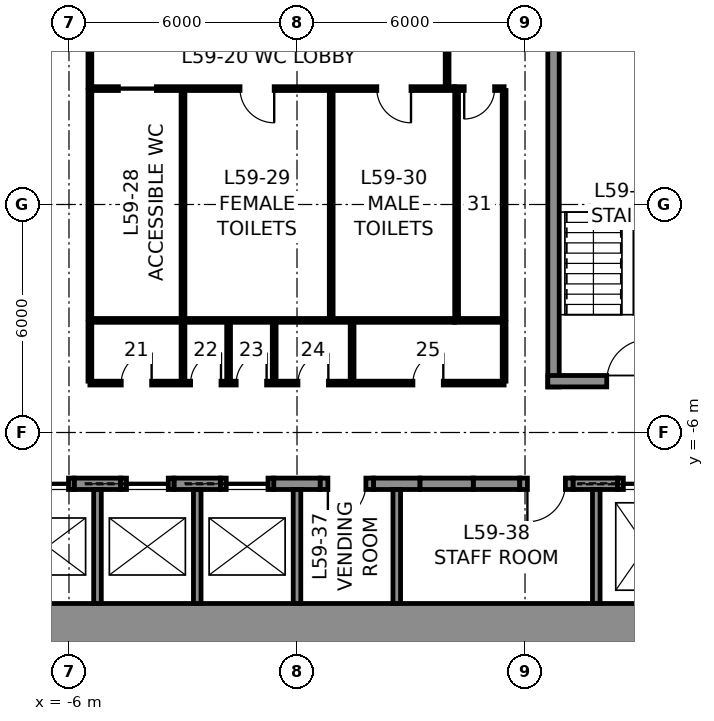
"""IFC4 building model, lengths in metres.
Left out: names, types, materials, properties, quantities, classifications, styles, units other than length and angle.
Written with IfcOpenShell. Run it as: python <this file> out.ifc"""

import sys

from ifc_helpers import new_model, si_unit, direction, frame, frame_2d, origin, place, context, subcontext, project, spatial, rectangle, extrude, element, fill, save


model = new_model("IFC4")
c1 = context("Model", 3, precision=1e-05, world=origin(), true_north=direction((0.0, 1.0)))
c2 = subcontext(c1, "Body", "Model", "MODEL_VIEW")
j1 = project(units=[si_unit("LENGTHUNIT", "METRE"), si_unit("PLANEANGLEUNIT", "RADIAN")], contexts=[c1])
p1 = place(None, origin())
s1 = spatial("IfcSite", under=j1, at=p1, CompositionType="ELEMENT")
p2 = place(p1, origin())
s2 = spatial("IfcBuilding", under=s1, at=p2, CompositionType="ELEMENT")
p3 = place(p2, frame((0.0, 0.0, 265.8)))
s3 = spatial("IfcBuildingStorey", under=s2, at=p3, CompositionType="ELEMENT", Elevation=265.8)
p4 = place(p3, frame((12.0, -11.25, 0.0), z_axis=(0.0, 0.0, 1.0), x_axis=(-1.0, 0.0, 0.0)))
e1 = element("IfcWall", 1, at=p4, inside=s3, PredefinedType="SHEAR", context=c2, shape_type="SweptSolid", body=[
    extrude(rectangle(XDim=24.0, YDim=1.5, at=frame_2d((12.0, 0.0))), origin(), (0.0, 0.0, 1.0), 4.0),
])
for number, where, z_axis, x_axis in (
    (2, (-5.863, -7.35, 0.0), (0.0, 0.0, 1.0), (1.0, 0.0, 0.0)),
    (3, (-3.238, -7.35, 0.0), (0.0, 0.0, 1.0), (1.0, 0.0, 0.0)),
    (4, (-0.613, -7.35, 0.0), (0.0, 0.0, 1.0), (1.0, 0.0, 0.0)),
    (5, (2.012, -7.35, 0.0), (0.0, 0.0, 1.0), (1.0, 0.0, 0.0)),
    (6, (4.637, -7.35, 0.0), (0.0, 0.0, 1.0), (1.0, 0.0, 0.0)),
):
    element("IfcWall", number, at=place(p3, frame(where, z_axis=z_axis, x_axis=x_axis)), inside=s3, PredefinedType="SHEAR", context=c2, shape_type="SweptSolid", body=[
        extrude(rectangle(XDim=1.225, YDim=0.3, at=frame_2d((0.613, 0.0))), origin(), (0.0, 0.0, 1.0), 4.0),
    ])
p5 = place(p3, frame((7.262, -7.35, 0.0), z_axis=(0.0, 0.0, 1.0), x_axis=(1.0, 0.0, 0.0)))
e7 = element("IfcWall", 7, at=p5, inside=s3, PredefinedType="SHEAR", context=c2, shape_type="SweptSolid", body=[
    extrude(rectangle(XDim=1.175, YDim=0.3, at=frame_2d((0.587, 0.0))), origin(), (0.0, 0.0, 1.0), 4.0),
])
p6 = place(p3, frame((-7.262, -7.35, 0.0), z_axis=(0.0, 0.0, 1.0), x_axis=(1.0, 0.0, 0.0)))
e8 = element("IfcWall", 8, at=p6, inside=s3, PredefinedType="PARTITIONING", context=c2, shape_type="SweptSolid", body=[
    extrude(rectangle(XDim=1.4, YDim=0.3, at=frame_2d((0.7, 0.0))), origin(), (0.0, 0.0, 1.0), 4.0),
])
p7 = place(p6, frame((0.15, 0.0, 0.0)))
e9 = element("IfcOpeningElement", 9, at=p7, cuts=e8, PredefinedType="OPENING", context=c2, shape_type="SweptSolid", body=[
    extrude(rectangle(XDim=1.1, YDim=2.3, at=frame_2d((0.55, 1.15))), frame((0.0, 0.16, 0.0), z_axis=(0.0, -1.0, 0.0), x_axis=(1.0, 0.0, 0.0)), (0.0, 0.0, 1.0), 0.32),
])
p8 = place(p3, frame((-4.637, -7.35, 0.0), z_axis=(0.0, 0.0, 1.0), x_axis=(1.0, 0.0, 0.0)))
e10 = element("IfcWall", 10, at=p8, inside=s3, PredefinedType="PARTITIONING", context=c2, shape_type="SweptSolid", body=[
    extrude(rectangle(XDim=1.4, YDim=0.3, at=frame_2d((0.7, 0.0))), origin(), (0.0, 0.0, 1.0), 4.0),
])
p9 = place(p8, frame((0.15, 0.0, 0.0)))
e11 = element("IfcOpeningElement", 11, at=p9, cuts=e10, PredefinedType="OPENING", context=c2, shape_type="SweptSolid", body=[
    extrude(rectangle(XDim=1.1, YDim=2.3, at=frame_2d((0.55, 1.15))), frame((0.0, 0.16, 0.0), z_axis=(0.0, -1.0, 0.0), x_axis=(1.0, 0.0, 0.0)), (0.0, 0.0, 1.0), 0.32),
])
p10 = place(p3, frame((-2.012, -7.35, 0.0), z_axis=(0.0, 0.0, 1.0), x_axis=(1.0, 0.0, 0.0)))
e12 = element("IfcWall", 12, at=p10, inside=s3, PredefinedType="PARTITIONING", context=c2, shape_type="SweptSolid", body=[
    extrude(rectangle(XDim=1.4, YDim=0.3, at=frame_2d((0.7, 0.0))), origin(), (0.0, 0.0, 1.0), 4.0),
])
p11 = place(p10, frame((0.15, 0.0, 0.0)))
e13 = element("IfcOpeningElement", 13, at=p11, cuts=e12, PredefinedType="OPENING", context=c2, shape_type="SweptSolid", body=[
    extrude(rectangle(XDim=1.1, YDim=2.3, at=frame_2d((0.55, 1.15))), frame((0.0, 0.16, 0.0), z_axis=(0.0, -1.0, 0.0), x_axis=(1.0, 0.0, 0.0)), (0.0, 0.0, 1.0), 0.32),
])
p12 = place(p3, frame((0.613, -7.35, 0.0), z_axis=(0.0, 0.0, 1.0), x_axis=(1.0, 0.0, 0.0)))
e14 = element("IfcWall", 14, at=p12, inside=s3, PredefinedType="PARTITIONING", context=c2, shape_type="SweptSolid", body=[
    extrude(rectangle(XDim=1.4, YDim=0.3, at=frame_2d((0.7, 0.0))), origin(), (0.0, 0.0, 1.0), 4.0),
])
p13 = place(p12, frame((0.2, 0.0, 0.0)))
e15 = element("IfcOpeningElement", 15, at=p13, cuts=e14, PredefinedType="OPENING", context=c2, shape_type="SweptSolid", body=[
    extrude(rectangle(XDim=1.0, YDim=2.3, at=frame_2d((0.5, 1.15))), frame((0.0, 0.16, 0.0), z_axis=(0.0, -1.0, 0.0), x_axis=(1.0, 0.0, 0.0)), (0.0, 0.0, 1.0), 0.32),
])
p14 = place(p3, frame((3.238, -7.35, 0.0), z_axis=(0.0, 0.0, 1.0), x_axis=(1.0, 0.0, 0.0)))
e16 = element("IfcWall", 16, at=p14, inside=s3, PredefinedType="PARTITIONING", context=c2, shape_type="SweptSolid", body=[
    extrude(rectangle(XDim=1.4, YDim=0.3, at=frame_2d((0.7, 0.0))), origin(), (0.0, 0.0, 1.0), 4.0),
])
p15 = place(p3, frame((5.863, -7.35, 0.0), z_axis=(0.0, 0.0, 1.0), x_axis=(1.0, 0.0, 0.0)))
e17 = element("IfcWall", 17, at=p15, inside=s3, PredefinedType="PARTITIONING", context=c2, shape_type="SweptSolid", body=[
    extrude(rectangle(XDim=1.4, YDim=0.3, at=frame_2d((0.7, 0.0))), origin(), (0.0, 0.0, 1.0), 4.0),
])
p16 = place(p15, frame((0.2, 0.0, 0.0)))
e18 = element("IfcOpeningElement", 18, at=p16, cuts=e17, PredefinedType="OPENING", context=c2, shape_type="SweptSolid", body=[
    extrude(rectangle(XDim=1.0, YDim=2.3, at=frame_2d((0.5, 1.15))), frame((0.0, 0.16, 0.0), z_axis=(0.0, -1.0, 0.0), x_axis=(1.0, 0.0, 0.0)), (0.0, 0.0, 1.0), 0.32),
])
p17 = place(p3, frame((8.438, -7.35, 0.0), z_axis=(0.0, 0.0, 1.0), x_axis=(1.0, 0.0, 0.0)))
e19 = element("IfcWall", 19, at=p17, inside=s3, PredefinedType="PARTITIONING", context=c2, shape_type="SweptSolid", body=[
    extrude(rectangle(XDim=1.5, YDim=0.3, at=frame_2d((0.75, 0.0))), origin(), (0.0, 0.0, 1.0), 4.0),
])
p18 = place(p17, frame((0.15, 0.0, 0.0)))
e20 = element("IfcOpeningElement", 20, at=p18, cuts=e19, PredefinedType="OPENING", context=c2, shape_type="SweptSolid", body=[
    extrude(rectangle(XDim=1.2, YDim=2.3, at=frame_2d((0.6, 1.15))), frame((0.0, 0.16, 0.0), z_axis=(0.0, -1.0, 0.0), x_axis=(1.0, 0.0, 0.0)), (0.0, 0.0, 1.0), 0.32),
])
for number, where, z_axis, x_axis in (
    (21, (-5.25, -10.5, 0.0), (0.0, 0.0, 1.0), (0.0, 1.0, 0.0)),
    (22, (-2.625, -10.5, 0.0), (0.0, 0.0, 1.0), (0.0, 1.0, 0.0)),
    (23, (0.0, -10.5, 0.0), (0.0, 0.0, 1.0), (0.0, 1.0, 0.0)),
    (24, (2.625, -10.5, 0.0), (0.0, 0.0, 1.0), (0.0, 1.0, 0.0)),
    (25, (7.875, -10.5, 0.0), (0.0, 0.0, 1.0), (0.0, 1.0, 0.0)),
):
    element("IfcWall", number, at=place(p3, frame(where, z_axis=z_axis, x_axis=x_axis)), inside=s3, PredefinedType="PARTITIONING", context=c2, shape_type="SweptSolid", body=[
        extrude(rectangle(XDim=3.0, YDim=0.2, at=frame_2d((1.5, 0.0))), origin(), (0.0, 0.0, 1.0), 4.0),
    ])
p19 = place(p3, frame((6.75, -4.8, 0.0), z_axis=(0.0, 0.0, 1.0), x_axis=(0.0, 1.0, 0.0)))
e26 = element("IfcWall", 26, at=p19, inside=s3, PredefinedType="SOLIDWALL", context=c2, shape_type="SweptSolid", body=[
    extrude(rectangle(XDim=9.6, YDim=0.3, at=frame_2d((4.8, 0.0))), origin(), (0.0, 0.0, 1.0), 3.75),
])
p20 = place(p3, frame((10.5, -4.65, 0.0), z_axis=(0.0, 0.0, 1.0), x_axis=(-1.0, 0.0, 0.0)))
e27 = element("IfcWall", 27, at=p20, inside=s3, PredefinedType="SOLIDWALL", context=c2, shape_type="SweptSolid", body=[
    extrude(rectangle(XDim=3.9, YDim=0.3, at=frame_2d((1.95, 0.0))), origin(), (0.0, 0.0, 1.0), 3.75),
])
p21 = place(p20, frame((1.25, 0.0, 0.0)))
e28 = element("IfcOpeningElement", 28, at=p21, cuts=e27, PredefinedType="OPENING", context=c2, shape_type="SweptSolid", body=[
    extrude(rectangle(XDim=1.1, YDim=2.3, at=frame_2d((0.55, 1.15))), frame((0.0, 0.16, 0.0), z_axis=(0.0, -1.0, 0.0), x_axis=(1.0, 0.0, 0.0)), (0.0, 0.0, 1.0), 0.32),
])
p22 = place(p3, frame((-5.45, 3.05, 0.0), z_axis=(0.0, 0.0, 1.0), x_axis=(1.0, 0.0, 0.0)))
e29 = element("IfcWall", 29, at=p22, inside=s3, PredefinedType="PARTITIONING", context=c2, shape_type="SweptSolid", body=[
    extrude(rectangle(XDim=9.6, YDim=0.1, at=frame_2d((4.8, 0.0))), origin(), (0.0, 0.0, 1.0), 3.75),
])
p23 = place(p22, frame((0.75, 0.0, 0.0)))
e30 = element("IfcOpeningElement", 30, at=p23, cuts=e29, PredefinedType="OPENING", context=c2, shape_type="SweptSolid", body=[
    extrude(rectangle(XDim=1.0, YDim=2.3, at=frame_2d((0.5, 1.15))), frame((0.0, 0.06, 0.0), z_axis=(0.0, -1.0, 0.0), x_axis=(1.0, 0.0, 0.0)), (0.0, 0.0, 1.0), 0.12),
])
p24 = place(p22, frame((3.95, 0.0, 0.0)))
e31 = element("IfcOpeningElement", 31, at=p24, cuts=e29, PredefinedType="OPENING", context=c2, shape_type="SweptSolid", body=[
    extrude(rectangle(XDim=0.9, YDim=2.3, at=frame_2d((0.45, 1.15))), frame((0.0, 0.06, 0.0), z_axis=(0.0, -1.0, 0.0), x_axis=(1.0, 0.0, 0.0)), (0.0, 0.0, 1.0), 0.12),
])
p25 = place(p22, frame((7.55, 0.0, 0.0)))
e32 = element("IfcOpeningElement", 32, at=p25, cuts=e29, PredefinedType="OPENING", context=c2, shape_type="SweptSolid", body=[
    extrude(rectangle(XDim=0.9, YDim=2.3, at=frame_2d((0.45, 1.15))), frame((0.0, 0.06, 0.0), z_axis=(0.0, -1.0, 0.0), x_axis=(1.0, 0.0, 0.0)), (0.0, 0.0, 1.0), 0.12),
])
p26 = place(p3, frame((4.15, 3.05, 0.0), z_axis=(0.0, 0.0, 1.0), x_axis=(1.0, 0.0, 0.0)))
e33 = element("IfcWall", 33, at=p26, inside=s3, PredefinedType="PARTITIONING", context=c2, shape_type="SweptSolid", body=[
    extrude(rectangle(XDim=1.3, YDim=0.1, at=frame_2d((0.65, 0.0))), origin(), (0.0, 0.0, 1.0), 3.75),
])
p27 = place(p26, frame((0.25, 0.0, 0.0)))
e34 = element("IfcOpeningElement", 34, at=p27, cuts=e33, PredefinedType="OPENING", context=c2, shape_type="SweptSolid", body=[
    extrude(rectangle(XDim=0.8, YDim=2.3, at=frame_2d((0.4, 1.15))), frame((0.0, 0.06, 0.0), z_axis=(0.0, -1.0, 0.0), x_axis=(1.0, 0.0, 0.0)), (0.0, 0.0, 1.0), 0.12),
])
p28 = place(p3, frame((4.15, -3.05, 0.0), z_axis=(0.0, 0.0, 1.0), x_axis=(-1.0, 0.0, 0.0)))
e35 = element("IfcWall", 35, at=p28, inside=s3, PredefinedType="PARTITIONING", context=c2, shape_type="SweptSolid", body=[
    extrude(rectangle(XDim=9.6, YDim=0.1, at=frame_2d((4.8, 0.0))), origin(), (0.0, 0.0, 1.0), 3.75),
])
p29 = place(p3, frame((5.45, -3.05, 0.0), z_axis=(0.0, 0.0, 1.0), x_axis=(-1.0, 0.0, 0.0)))
e36 = element("IfcWall", 36, at=p29, inside=s3, PredefinedType="PARTITIONING", context=c2, shape_type="SweptSolid", body=[
    extrude(rectangle(XDim=1.3, YDim=0.1, at=frame_2d((0.65, 0.0))), origin(), (0.0, 0.0, 1.0), 3.75),
])
for number, where, z_axis, x_axis in (
    (37, (5.45, 3.0, 0.0), (0.0, 0.0, 1.0), (0.0, -1.0, 0.0)),
    (38, (-5.45, -3.0, 0.0), (0.0, 0.0, 1.0), (0.0, 1.0, 0.0)),
    (39, (-3.0, -3.0, 0.0), (0.0, 0.0, 1.0), (0.0, 1.0, 0.0)),
    (40, (0.9, -3.0, 0.0), (0.0, 0.0, 1.0), (0.0, 1.0, 0.0)),
    (41, (4.2, -3.0, 0.0), (0.0, 0.0, 1.0), (0.0, 1.0, 0.0)),
):
    element("IfcWall", number, at=place(p3, frame(where, z_axis=z_axis, x_axis=x_axis)), inside=s3, PredefinedType="PARTITIONING", context=c2, shape_type="SweptSolid", body=[
        extrude(rectangle(XDim=6.0, YDim=0.1, at=frame_2d((3.0, 0.0))), origin(), (0.0, 0.0, 1.0), 3.75),
    ])
for number, where, z_axis, x_axis in (
    (42, (-5.45, 3.1, 0.0), (0.0, 0.0, 1.0), (0.0, 1.0, 0.0)),
    (43, (3.95, 3.1, 0.0), (0.0, 0.0, 1.0), (0.0, 1.0, 0.0)),
):
    element("IfcWall", number, at=place(p3, frame(where, z_axis=z_axis, x_axis=x_axis)), inside=s3, PredefinedType="PARTITIONING", context=c2, shape_type="SweptSolid", body=[
        extrude(rectangle(XDim=1.55, YDim=0.1, at=frame_2d((0.775, 0.0))), origin(), (0.0, 0.0, 1.0), 3.75),
    ])
p30 = place(p3, frame((5.45, -4.7, 0.0), z_axis=(0.0, 0.0, 1.0), x_axis=(-1.0, 0.0, 0.0)))
e44 = element("IfcWall", 44, at=p30, inside=s3, PredefinedType="PARTITIONING", context=c2, shape_type="SweptSolid", body=[
    extrude(rectangle(XDim=10.9, YDim=0.1, at=frame_2d((5.45, 0.0))), origin(), (0.0, 0.0, 1.0), 3.75),
])
p31 = place(p30, frame((9.275, 0.0, 0.0)))
e45 = element("IfcOpeningElement", 45, at=p31, cuts=e44, PredefinedType="OPENING", context=c2, shape_type="SweptSolid", body=[
    extrude(rectangle(XDim=0.8, YDim=2.3, at=frame_2d((0.4, 1.15))), frame((0.0, 0.06, 0.0), z_axis=(0.0, -1.0, 0.0), x_axis=(1.0, 0.0, 0.0)), (0.0, 0.0, 1.0), 0.12),
])
p32 = place(p30, frame((7.45, 0.0, 0.0)))
e46 = element("IfcOpeningElement", 46, at=p32, cuts=e44, PredefinedType="OPENING", context=c2, shape_type="SweptSolid", body=[
    extrude(rectangle(XDim=0.8, YDim=2.3, at=frame_2d((0.4, 1.15))), frame((0.0, 0.06, 0.0), z_axis=(0.0, -1.0, 0.0), x_axis=(1.0, 0.0, 0.0)), (0.0, 0.0, 1.0), 0.12),
])
p33 = place(p30, frame((6.25, 0.0, 0.0)))
e47 = element("IfcOpeningElement", 47, at=p33, cuts=e44, PredefinedType="OPENING", context=c2, shape_type="SweptSolid", body=[
    extrude(rectangle(XDim=0.8, YDim=2.3, at=frame_2d((0.4, 1.15))), frame((0.0, 0.06, 0.0), z_axis=(0.0, -1.0, 0.0), x_axis=(1.0, 0.0, 0.0)), (0.0, 0.0, 1.0), 0.12),
])
p34 = place(p30, frame((4.625, 0.0, 0.0)))
e48 = element("IfcOpeningElement", 48, at=p34, cuts=e44, PredefinedType="OPENING", context=c2, shape_type="SweptSolid", body=[
    extrude(rectangle(XDim=0.8, YDim=2.3, at=frame_2d((0.4, 1.15))), frame((0.0, 0.06, 0.0), z_axis=(0.0, -1.0, 0.0), x_axis=(1.0, 0.0, 0.0)), (0.0, 0.0, 1.0), 0.12),
])
p35 = place(p30, frame((1.6, 0.0, 0.0)))
e49 = element("IfcOpeningElement", 49, at=p35, cuts=e44, PredefinedType="OPENING", context=c2, shape_type="SweptSolid", body=[
    extrude(rectangle(XDim=0.8, YDim=2.3, at=frame_2d((0.4, 1.15))), frame((0.0, 0.06, 0.0), z_axis=(0.0, -1.0, 0.0), x_axis=(1.0, 0.0, 0.0)), (0.0, 0.0, 1.0), 0.12),
])
for number, where, z_axis, x_axis in (
    (50, (-5.45, -3.1, 0.0), (0.0, 0.0, 1.0), (0.0, -1.0, 0.0)),
    (51, (5.45, -3.1, 0.0), (0.0, 0.0, 1.0), (0.0, -1.0, 0.0)),
    (52, (-3.0, -3.1, 0.0), (0.0, 0.0, 1.0), (0.0, -1.0, 0.0)),
    (53, (-1.8, -3.1, 0.0), (0.0, 0.0, 1.0), (0.0, -1.0, 0.0)),
    (54, (-0.6, -3.1, 0.0), (0.0, 0.0, 1.0), (0.0, -1.0, 0.0)),
    (55, (1.45, -3.1, 0.0), (0.0, 0.0, 1.0), (0.0, -1.0, 0.0)),
):
    element("IfcWall", number, at=place(p3, frame(where, z_axis=z_axis, x_axis=x_axis)), inside=s3, PredefinedType="PARTITIONING", context=c2, shape_type="SweptSolid", body=[
        extrude(rectangle(XDim=1.55, YDim=0.1, at=frame_2d((0.775, 0.0))), origin(), (0.0, 0.0, 1.0), 3.75),
    ])
p36 = place(p21, frame((1.1, 0.0, 0.0), z_axis=(0.0, 0.0, 1.0), x_axis=(-1.0, 0.0, 0.0)))
e56 = element("IfcDoor", 56, at=p36, inside=s3, OperationType="SINGLE_SWING_RIGHT", PredefinedType="DOOR", context=c2, shape_type="SweptSolid", body=[
    extrude(rectangle(XDim=1.1, YDim=2.3, at=frame_2d((0.55, 1.15))), frame((0.0, 0.025, 0.0), z_axis=(0.0, -1.0, 0.0), x_axis=(1.0, 0.0, 0.0)), (0.0, 0.0, 1.0), 0.05),
])
fill(e28, e56)
p37 = place(p23, frame((1.0, 0.0, 0.0), z_axis=(0.0, 0.0, 1.0), x_axis=(-1.0, 0.0, 0.0)))
e57 = element("IfcDoor", 57, at=p37, inside=s3, OperationType="SLIDING_TO_LEFT", PredefinedType="DOOR", context=c2, shape_type="SweptSolid", body=[
    extrude(rectangle(XDim=1.0, YDim=2.3, at=frame_2d((0.5, 1.15))), frame((0.0, 0.025, 0.0), z_axis=(0.0, -1.0, 0.0), x_axis=(1.0, 0.0, 0.0)), (0.0, 0.0, 1.0), 0.05),
])
fill(e30, e57)
p38 = place(p24, frame((0.9, 0.0, 0.0), z_axis=(0.0, 0.0, 1.0), x_axis=(-1.0, 0.0, 0.0)))
e58 = element("IfcDoor", 58, at=p38, inside=s3, OperationType="SINGLE_SWING_LEFT", PredefinedType="DOOR", context=c2, shape_type="SweptSolid", body=[
    extrude(rectangle(XDim=0.9, YDim=2.3, at=frame_2d((0.45, 1.15))), frame((0.0, 0.025, 0.0), z_axis=(0.0, -1.0, 0.0), x_axis=(1.0, 0.0, 0.0)), (0.0, 0.0, 1.0), 0.05),
])
fill(e31, e58)
p39 = place(p25, frame((0.9, 0.0, 0.0), z_axis=(0.0, 0.0, 1.0), x_axis=(-1.0, 0.0, 0.0)))
e59 = element("IfcDoor", 59, at=p39, inside=s3, OperationType="SINGLE_SWING_LEFT", PredefinedType="DOOR", context=c2, shape_type="SweptSolid", body=[
    extrude(rectangle(XDim=0.9, YDim=2.3, at=frame_2d((0.45, 1.15))), frame((0.0, 0.025, 0.0), z_axis=(0.0, -1.0, 0.0), x_axis=(1.0, 0.0, 0.0)), (0.0, 0.0, 1.0), 0.05),
])
fill(e32, e59)
p40 = place(p27, frame((0.8, 0.0, 0.0), z_axis=(0.0, 0.0, 1.0), x_axis=(-1.0, 0.0, 0.0)))
e60 = element("IfcDoor", 60, at=p40, inside=s3, OperationType="SINGLE_SWING_RIGHT", PredefinedType="DOOR", context=c2, shape_type="SweptSolid", body=[
    extrude(rectangle(XDim=0.8, YDim=2.3, at=frame_2d((0.4, 1.15))), frame((0.0, 0.025, 0.0), z_axis=(0.0, -1.0, 0.0), x_axis=(1.0, 0.0, 0.0)), (0.0, 0.0, 1.0), 0.05),
])
fill(e34, e60)
p41 = place(p31, frame((0.8, 0.0, 0.0), z_axis=(0.0, 0.0, 1.0), x_axis=(-1.0, 0.0, 0.0)))
e61 = element("IfcDoor", 61, at=p41, inside=s3, OperationType="SINGLE_SWING_RIGHT", PredefinedType="DOOR", context=c2, shape_type="SweptSolid", body=[
    extrude(rectangle(XDim=0.8, YDim=2.3, at=frame_2d((0.4, 1.15))), frame((0.0, 0.025, 0.0), z_axis=(0.0, -1.0, 0.0), x_axis=(1.0, 0.0, 0.0)), (0.0, 0.0, 1.0), 0.05),
])
fill(e45, e61)
p42 = place(p32, frame((0.8, 0.0, 0.0), z_axis=(0.0, 0.0, 1.0), x_axis=(-1.0, 0.0, 0.0)))
e62 = element("IfcDoor", 62, at=p42, inside=s3, OperationType="SINGLE_SWING_RIGHT", PredefinedType="DOOR", context=c2, shape_type="SweptSolid", body=[
    extrude(rectangle(XDim=0.8, YDim=2.3, at=frame_2d((0.4, 1.15))), frame((0.0, 0.025, 0.0), z_axis=(0.0, -1.0, 0.0), x_axis=(1.0, 0.0, 0.0)), (0.0, 0.0, 1.0), 0.05),
])
fill(e46, e62)
p43 = place(p33, frame((0.8, 0.0, 0.0), z_axis=(0.0, 0.0, 1.0), x_axis=(-1.0, 0.0, 0.0)))
e63 = element("IfcDoor", 63, at=p43, inside=s3, OperationType="SINGLE_SWING_RIGHT", PredefinedType="DOOR", context=c2, shape_type="SweptSolid", body=[
    extrude(rectangle(XDim=0.8, YDim=2.3, at=frame_2d((0.4, 1.15))), frame((0.0, 0.025, 0.0), z_axis=(0.0, -1.0, 0.0), x_axis=(1.0, 0.0, 0.0)), (0.0, 0.0, 1.0), 0.05),
])
fill(e47, e63)
p44 = place(p34, frame((0.8, 0.0, 0.0), z_axis=(0.0, 0.0, 1.0), x_axis=(-1.0, 0.0, 0.0)))
e64 = element("IfcDoor", 64, at=p44, inside=s3, OperationType="SINGLE_SWING_RIGHT", PredefinedType="DOOR", context=c2, shape_type="SweptSolid", body=[
    extrude(rectangle(XDim=0.8, YDim=2.3, at=frame_2d((0.4, 1.15))), frame((0.0, 0.025, 0.0), z_axis=(0.0, -1.0, 0.0), x_axis=(1.0, 0.0, 0.0)), (0.0, 0.0, 1.0), 0.05),
])
fill(e48, e64)
p45 = place(p35, frame((0.8, 0.0, 0.0), z_axis=(0.0, 0.0, 1.0), x_axis=(-1.0, 0.0, 0.0)))
e65 = element("IfcDoor", 65, at=p45, inside=s3, OperationType="SINGLE_SWING_RIGHT", PredefinedType="DOOR", context=c2, shape_type="SweptSolid", body=[
    extrude(rectangle(XDim=0.8, YDim=2.3, at=frame_2d((0.4, 1.15))), frame((0.0, 0.025, 0.0), z_axis=(0.0, -1.0, 0.0), x_axis=(1.0, 0.0, 0.0)), (0.0, 0.0, 1.0), 0.05),
])
fill(e49, e65)
p46 = place(p13, frame((1.0, 0.0, 0.0), z_axis=(0.0, 0.0, 1.0), x_axis=(-1.0, 0.0, 0.0)))
e66 = element("IfcDoor", 66, at=p46, inside=s3, OperationType="SINGLE_SWING_RIGHT", PredefinedType="DOOR", context=c2, shape_type="SweptSolid", body=[
    extrude(rectangle(XDim=1.0, YDim=2.3, at=frame_2d((0.5, 1.15))), frame((0.0, 0.025, 0.0), z_axis=(0.0, -1.0, 0.0), x_axis=(1.0, 0.0, 0.0)), (0.0, 0.0, 1.0), 0.05),
])
fill(e15, e66)
p47 = place(p16, frame((1.0, 0.0, 0.0), z_axis=(0.0, 0.0, 1.0), x_axis=(-1.0, 0.0, 0.0)))
e67 = element("IfcDoor", 67, at=p47, inside=s3, OperationType="SINGLE_SWING_RIGHT", PredefinedType="DOOR", context=c2, shape_type="SweptSolid", body=[
    extrude(rectangle(XDim=1.0, YDim=2.3, at=frame_2d((0.5, 1.15))), frame((0.0, 0.025, 0.0), z_axis=(0.0, -1.0, 0.0), x_axis=(1.0, 0.0, 0.0)), (0.0, 0.0, 1.0), 0.05),
])
fill(e18, e67)
p48 = place(p18, origin())
e68 = element("IfcDoor", 68, at=p48, inside=s3, OperationType="SLIDING_TO_LEFT", PredefinedType="DOOR", context=c2, shape_type="SweptSolid", body=[
    extrude(rectangle(XDim=1.2, YDim=2.3, at=frame_2d((0.6, 1.15))), frame((0.0, 0.025, 0.0), z_axis=(0.0, -1.0, 0.0), x_axis=(1.0, 0.0, 0.0)), (0.0, 0.0, 1.0), 0.05),
])
fill(e20, e68)
p49 = place(p11, origin())
e69 = element("IfcDoor", 69, at=p49, inside=s3, OperationType="SLIDING_TO_LEFT", PredefinedType="DOOR", context=c2, shape_type="SweptSolid", body=[
    extrude(rectangle(XDim=1.1, YDim=2.3, at=frame_2d((0.55, 1.15))), frame((0.0, 0.025, 0.0), z_axis=(0.0, -1.0, 0.0), x_axis=(1.0, 0.0, 0.0)), (0.0, 0.0, 1.0), 0.05),
])
fill(e13, e69)
p50 = place(p9, origin())
e70 = element("IfcDoor", 70, at=p50, inside=s3, OperationType="SLIDING_TO_LEFT", PredefinedType="DOOR", context=c2, shape_type="SweptSolid", body=[
    extrude(rectangle(XDim=1.1, YDim=2.3, at=frame_2d((0.55, 1.15))), frame((0.0, 0.025, 0.0), z_axis=(0.0, -1.0, 0.0), x_axis=(1.0, 0.0, 0.0)), (0.0, 0.0, 1.0), 0.05),
])
fill(e11, e70)
p51 = place(p7, origin())
e71 = element("IfcDoor", 71, at=p51, inside=s3, OperationType="SLIDING_TO_LEFT", PredefinedType="DOOR", context=c2, shape_type="SweptSolid", body=[
    extrude(rectangle(XDim=1.1, YDim=2.3, at=frame_2d((0.55, 1.15))), frame((0.0, 0.025, 0.0), z_axis=(0.0, -1.0, 0.0), x_axis=(1.0, 0.0, 0.0)), (0.0, 0.0, 1.0), 0.05),
])
fill(e9, e71)
save(model, sys.argv[1])
